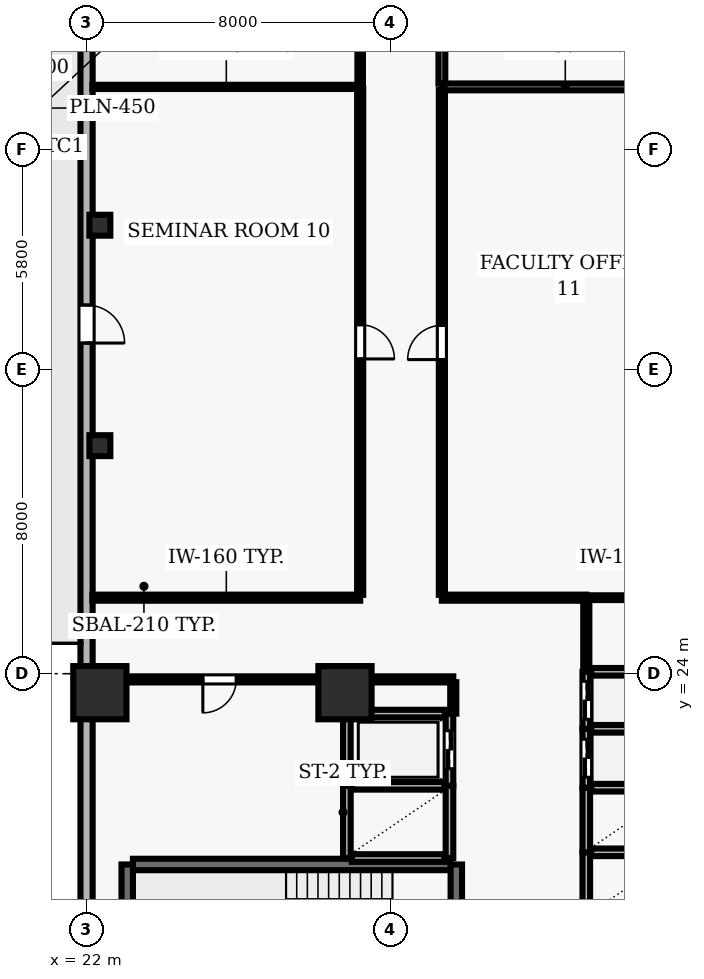
"""IFC4 building model, lengths in metres.
Left out: names, types, materials, properties, quantities, classifications, styles, units other than length and angle.
Written with IfcOpenShell. Run it as: python <this file> out.ifc"""

import sys

from ifc_helpers import new_model, si_unit, direction, frame, frame_2d, origin, origin_2d, place, context, subcontext, project, spatial, rectangle, hollow_rectangle, extrude, element, fill, save


model = new_model("IFC4")
c1 = context("Model", 3, precision=1e-05, world=origin(), true_north=direction((0.0, 1.0)))
c2 = subcontext(c1, "Body", "Model", "MODEL_VIEW")
j1 = project(units=[si_unit("LENGTHUNIT", "METRE"), si_unit("PLANEANGLEUNIT", "RADIAN")], contexts=[c1])
p1 = place(None, origin())
s1 = spatial("IfcSite", under=j1, at=p1, CompositionType="ELEMENT")
p2 = place(p1, origin())
s2 = spatial("IfcBuilding", under=s1, at=p2, CompositionType="ELEMENT")
p3 = place(p2, frame((0.0, 0.0, 50.5)))
s3 = spatial("IfcBuildingStorey", under=s2, at=p3, CompositionType="ELEMENT", Elevation=50.5)
for number, where, z_axis, x_axis in (
    (1, (22.35, 23.5, 0.0), (0.0, 0.0, 1.0), (1.0, 0.0, 0.0)),
    (2, (28.8, 23.5, 0.0), (0.0, 0.0, 1.0), (1.0, 0.0, 0.0)),
):
    element("IfcColumn", number, at=place(p3, frame(where, z_axis=z_axis, x_axis=x_axis)), inside=s3, PredefinedType="COLUMN", context=c2, shape_type="SweptSolid", body=[
        extrude(rectangle(XDim=1.4, YDim=1.4, at=origin_2d()), origin(), (0.0, 0.0, 1.0), 3.9),
    ])
for number, where, z_axis, x_axis in (
    (3, (22.35, 30.0, 0.0), (0.0, 0.0, 1.0), (1.0, 0.0, 0.0)),
    (4, (22.35, 35.8, 0.0), (0.0, 0.0, 1.0), (1.0, 0.0, 0.0)),
):
    element("IfcColumn", number, at=place(p3, frame(where, z_axis=z_axis, x_axis=x_axis)), inside=s3, PredefinedType="COLUMN", context=c2, shape_type="SweptSolid", body=[
        extrude(hollow_rectangle(XDim=0.55, YDim=0.55, WallThickness=0.025, at=origin_2d()), origin(), (0.0, 0.0, 1.0), 3.9),
    ])
p4 = place(p3, frame((22.0, 51.5, 0.0), z_axis=(0.0, 0.0, 1.0), x_axis=(0.0, -1.0, 0.0)))
e5 = element("IfcWall", 5, at=p4, inside=s3, PredefinedType="SOLIDWALL", context=c2, shape_type="SweptSolid", body=[
    extrude(rectangle(XDim=49.0, YDim=0.32, at=frame_2d((24.5, 0.0))), origin(), (0.0, 0.0, 1.0), 3.69),
])
p5 = place(p4, frame((17.8, 0.0, 0.0)))
e6 = element("IfcOpeningElement", 6, at=p5, cuts=e5, PredefinedType="OPENING", context=c2, shape_type="SweptSolid", body=[
    extrude(rectangle(XDim=1.0, YDim=2.2, at=frame_2d((0.5, 1.1))), frame((0.0, 0.17, 0.0), z_axis=(0.0, -1.0, 0.0), x_axis=(1.0, 0.0, 0.0)), (0.0, 0.0, 1.0), 0.34),
])
p6 = place(p4, frame((1.222, 0.0, 0.9)))
e7 = element("IfcOpeningElement", 7, at=p6, cuts=e5, PredefinedType="OPENING", context=c2, shape_type="SweptSolid", body=[
    extrude(rectangle(XDim=3.0, YDim=2.2, at=frame_2d((1.5, 1.1))), frame((0.0, 0.17, 0.0), z_axis=(0.0, -1.0, 0.0), x_axis=(1.0, 0.0, 0.0)), (0.0, 0.0, 1.0), 0.34),
])
p7 = place(p4, frame((6.667, 0.0, 0.9)))
e8 = element("IfcOpeningElement", 8, at=p7, cuts=e5, PredefinedType="OPENING", context=c2, shape_type="SweptSolid", body=[
    extrude(rectangle(XDim=3.0, YDim=2.2, at=frame_2d((1.5, 1.1))), frame((0.0, 0.17, 0.0), z_axis=(0.0, -1.0, 0.0), x_axis=(1.0, 0.0, 0.0)), (0.0, 0.0, 1.0), 0.34),
])
p8 = place(p4, frame((39.333, 0.0, 0.9)))
e9 = element("IfcOpeningElement", 9, at=p8, cuts=e5, PredefinedType="OPENING", context=c2, shape_type="SweptSolid", body=[
    extrude(rectangle(XDim=3.0, YDim=2.2, at=frame_2d((1.5, 1.1))), frame((0.0, 0.17, 0.0), z_axis=(0.0, -1.0, 0.0), x_axis=(1.0, 0.0, 0.0)), (0.0, 0.0, 1.0), 0.34),
])
p9 = place(p3, frame((31.58, 18.98, 0.0), z_axis=(0.0, 0.0, 1.0), x_axis=(-1.0, 0.0, 0.0)))
e10 = element("IfcWall", 10, at=p9, inside=s3, PredefinedType="SHEAR", context=c2, shape_type="SweptSolid", body=[
    extrude(rectangle(XDim=8.36, YDim=0.3, at=frame_2d((4.18, 0.0))), origin(), (0.0, 0.0, 1.0), 3.69),
])
p10 = place(p3, frame((23.07, 18.98, 0.0), z_axis=(0.0, 0.0, 1.0), x_axis=(0.0, -1.0, 0.0)))
e11 = element("IfcWall", 11, at=p10, inside=s3, PredefinedType="SHEAR", context=c2, shape_type="SweptSolid", body=[
    extrude(rectangle(XDim=3.51, YDim=0.3, at=frame_2d((1.755, 0.0))), origin(), (0.0, 0.0, 1.0), 3.69),
])
p11 = place(p3, frame((31.73, 15.47, 0.0), z_axis=(0.0, 0.0, 1.0), x_axis=(0.0, 1.0, 0.0)))
e12 = element("IfcWall", 12, at=p11, inside=s3, PredefinedType="SHEAR", context=c2, shape_type="SweptSolid", body=[
    extrude(rectangle(XDim=3.51, YDim=0.3, at=frame_2d((1.755, 0.0))), origin(), (0.0, 0.0, 1.0), 3.69),
])
p12 = place(p11, frame((1.18, 0.0, 0.0)))
e13 = element("IfcOpeningElement", 13, at=p12, cuts=e12, PredefinedType="OPENING", context=c2, shape_type="SweptSolid", body=[
    extrude(rectangle(XDim=1.15, YDim=2.15, at=frame_2d((0.575, 1.075))), frame((0.0, 0.16, 0.0), z_axis=(0.0, -1.0, 0.0), x_axis=(1.0, 0.0, 0.0)), (0.0, 0.0, 1.0), 0.32),
])
p13 = place(p3, frame((35.15, 19.3, 0.0), z_axis=(0.0, 0.0, 1.0), x_axis=(0.0, -1.0, 0.0)))
e14 = element("IfcWall", 14, at=p13, inside=s3, PredefinedType="SOLIDWALL", context=c2, shape_type="SweptSolid", body=[
    extrude(rectangle(XDim=1.7, YDim=0.2, at=frame_2d((0.85, 0.0))), origin(), (0.0, 0.0, 1.0), 3.69),
])
p14 = place(p3, frame((37.42, 19.3, 0.0), z_axis=(0.0, 0.0, 1.0), x_axis=(-1.0, 0.0, 0.0)))
e15 = element("IfcWall", 15, at=p14, inside=s3, PredefinedType="SOLIDWALL", context=c2, shape_type="SweptSolid", body=[
    extrude(rectangle(XDim=2.14, YDim=0.2, at=frame_2d((1.07, 0.0))), origin(), (0.0, 0.0, 1.0), 3.69),
])
p15 = place(p3, frame((35.15, 21.0, 0.0), z_axis=(0.0, 0.0, 1.0), x_axis=(0.0, -1.0, 0.0)))
e16 = element("IfcWall", 16, at=p15, inside=s3, PredefinedType="SOLIDWALL", context=c2, shape_type="SweptSolid", body=[
    extrude(rectangle(XDim=1.7, YDim=0.2, at=frame_2d((0.85, 0.0))), origin(), (0.0, 0.0, 1.0), 3.69),
])
p16 = place(p3, frame((37.42, 21.0, 0.0), z_axis=(0.0, 0.0, 1.0), x_axis=(-1.0, 0.0, 0.0)))
e17 = element("IfcWall", 17, at=p16, inside=s3, PredefinedType="SOLIDWALL", context=c2, shape_type="SweptSolid", body=[
    extrude(rectangle(XDim=2.14, YDim=0.2, at=frame_2d((1.07, 0.0))), origin(), (0.0, 0.0, 1.0), 3.69),
])
for number, where, z_axis, x_axis in (
    (18, (28.85, 21.05, 0.0), (0.0, 0.0, 1.0), (0.0, -1.0, 0.0)),
    (19, (31.55, 19.15, 0.0), (0.0, 0.0, 1.0), (0.0, 1.0, 0.0)),
):
    element("IfcWall", number, at=place(p3, frame(where, z_axis=z_axis, x_axis=x_axis)), inside=s3, PredefinedType="SOLIDWALL", context=c2, shape_type="SweptSolid", body=[
        extrude(rectangle(XDim=1.9, YDim=0.2, at=frame_2d((0.95, 0.0))), origin(), (0.0, 0.0, 1.0), 3.69),
    ])
for number, where, z_axis, x_axis in (
    (20, (28.98, 19.15, 0.0), (0.0, 0.0, 1.0), (1.0, 0.0, 0.0)),
    (21, (31.42, 21.05, 0.0), (0.0, 0.0, 1.0), (-1.0, 0.0, 0.0)),
):
    element("IfcWall", number, at=place(p3, frame(where, z_axis=z_axis, x_axis=x_axis)), inside=s3, PredefinedType="SOLIDWALL", context=c2, shape_type="SweptSolid", body=[
        extrude(rectangle(XDim=2.44, YDim=0.2, at=frame_2d((1.22, 0.0))), origin(), (0.0, 0.0, 1.0), 3.69),
    ])
p17 = place(p3, frame((35.15, 22.55, 0.0), z_axis=(0.0, 0.0, 1.0), x_axis=(0.0, -1.0, 0.0)))
e22 = element("IfcWall", 22, at=p17, inside=s3, PredefinedType="SOLIDWALL", context=c2, shape_type="SweptSolid", body=[
    extrude(rectangle(XDim=1.55, YDim=0.2, at=frame_2d((0.775, 0.0))), origin(), (0.0, 0.0, 1.0), 3.69),
])
p18 = place(p17, frame((0.275, 0.0, 0.0)))
e23 = element("IfcOpeningElement", 23, at=p18, cuts=e22, PredefinedType="OPENING", context=c2, shape_type="SweptSolid", body=[
    extrude(rectangle(XDim=1.0, YDim=2.1, at=frame_2d((0.5, 1.05))), frame((0.0, 0.11, 0.0), z_axis=(0.0, -1.0, 0.0), x_axis=(1.0, 0.0, 0.0)), (0.0, 0.0, 1.0), 0.22),
])
p19 = place(p3, frame((37.42, 22.55, 0.0), z_axis=(0.0, 0.0, 1.0), x_axis=(-1.0, 0.0, 0.0)))
e24 = element("IfcWall", 24, at=p19, inside=s3, PredefinedType="SOLIDWALL", context=c2, shape_type="SweptSolid", body=[
    extrude(rectangle(XDim=2.14, YDim=0.2, at=frame_2d((1.07, 0.0))), origin(), (0.0, 0.0, 1.0), 3.69),
])
p20 = place(p3, frame((35.15, 24.05, 0.0), z_axis=(0.0, 0.0, 1.0), x_axis=(0.0, -1.0, 0.0)))
e25 = element("IfcWall", 25, at=p20, inside=s3, PredefinedType="SOLIDWALL", context=c2, shape_type="SweptSolid", body=[
    extrude(rectangle(XDim=1.5, YDim=0.2, at=frame_2d((0.75, 0.0))), origin(), (0.0, 0.0, 1.0), 3.69),
])
p21 = place(p20, frame((0.25, 0.0, 0.0)))
e26 = element("IfcOpeningElement", 26, at=p21, cuts=e25, PredefinedType="OPENING", context=c2, shape_type="SweptSolid", body=[
    extrude(rectangle(XDim=1.0, YDim=2.1, at=frame_2d((0.5, 1.05))), frame((0.0, 0.11, 0.0), z_axis=(0.0, -1.0, 0.0), x_axis=(1.0, 0.0, 0.0)), (0.0, 0.0, 1.0), 0.22),
])
p22 = place(p3, frame((37.42, 24.05, 0.0), z_axis=(0.0, 0.0, 1.0), x_axis=(-1.0, 0.0, 0.0)))
e27 = element("IfcWall", 27, at=p22, inside=s3, PredefinedType="SOLIDWALL", context=c2, shape_type="SweptSolid", body=[
    extrude(rectangle(XDim=2.14, YDim=0.2, at=frame_2d((1.07, 0.0))), origin(), (0.0, 0.0, 1.0), 3.69),
])
p23 = place(p3, frame((28.85, 22.95, 0.0), z_axis=(0.0, 0.0, 1.0), x_axis=(0.0, -1.0, 0.0)))
e28 = element("IfcWall", 28, at=p23, inside=s3, PredefinedType="SOLIDWALL", context=c2, shape_type="SweptSolid", body=[
    extrude(rectangle(XDim=1.9, YDim=0.2, at=frame_2d((0.95, 0.0))), origin(), (0.0, 0.0, 1.0), 3.69),
])
p24 = place(p3, frame((31.55, 21.05, 0.0), z_axis=(0.0, 0.0, 1.0), x_axis=(0.0, 1.0, 0.0)))
e29 = element("IfcWall", 29, at=p24, inside=s3, PredefinedType="SOLIDWALL", context=c2, shape_type="SweptSolid", body=[
    extrude(rectangle(XDim=1.9, YDim=0.2, at=frame_2d((0.95, 0.0))), origin(), (0.0, 0.0, 1.0), 3.69),
])
p25 = place(p24, frame((0.45, 0.0, 0.0)))
e30 = element("IfcOpeningElement", 30, at=p25, cuts=e29, PredefinedType="OPENING", context=c2, shape_type="SweptSolid", body=[
    extrude(rectangle(XDim=1.0, YDim=2.1, at=frame_2d((0.5, 1.05))), frame((0.0, 0.11, 0.0), z_axis=(0.0, -1.0, 0.0), x_axis=(1.0, 0.0, 0.0)), (0.0, 0.0, 1.0), 0.22),
])
p26 = place(p3, frame((31.43, 22.95, 0.0), z_axis=(0.0, 0.0, 1.0), x_axis=(-1.0, 0.0, 0.0)))
e31 = element("IfcWall", 31, at=p26, inside=s3, PredefinedType="SOLIDWALL", context=c2, shape_type="SweptSolid", body=[
    extrude(rectangle(XDim=2.46, YDim=0.2, at=frame_2d((1.23, 0.0))), origin(), (0.0, 0.0, 1.0), 3.69),
])
p27 = place(p3, frame((28.8, 23.85, 0.0), z_axis=(0.0, 0.0, 1.0), x_axis=(-1.0, 0.0, 0.0)))
e32 = element("IfcWall", 32, at=p27, inside=s3, PredefinedType="PARTITIONING", context=c2, shape_type="SweptSolid", body=[
    extrude(rectangle(XDim=6.6, YDim=0.16, at=frame_2d((3.3, 0.0))), origin(), (0.0, 0.0, 1.0), 3.055),
])
p28 = place(p27, frame((2.86, 0.0, 0.0)))
e33 = element("IfcOpeningElement", 33, at=p28, cuts=e32, PredefinedType="OPENING", context=c2, shape_type="SweptSolid", body=[
    extrude(rectangle(XDim=0.88, YDim=2.1, at=frame_2d((0.44, 1.05))), frame((0.0, 0.09, 0.0), z_axis=(0.0, -1.0, 0.0), x_axis=(1.0, 0.0, 0.0)), (0.0, 0.0, 1.0), 0.18),
])
p29 = place(p3, frame((28.8, 23.85, 0.0), z_axis=(0.0, 0.0, 1.0), x_axis=(1.0, 0.0, 0.0)))
e34 = element("IfcWall", 34, at=p29, inside=s3, PredefinedType="PARTITIONING", context=c2, shape_type="SweptSolid", body=[
    extrude(rectangle(XDim=2.85, YDim=0.16, at=frame_2d((1.425, 0.0))), origin(), (0.0, 0.0, 1.0), 3.69),
])
p30 = place(p3, frame((29.2, 26.0, 0.0), z_axis=(0.0, 0.0, 1.0), x_axis=(-1.0, 0.0, 0.0)))
e35 = element("IfcWall", 35, at=p30, inside=s3, PredefinedType="PARTITIONING", context=c2, shape_type="SweptSolid", body=[
    extrude(rectangle(XDim=7.045, YDim=0.16, at=frame_2d((3.522, 0.0))), origin(), (0.0, 0.0, 1.0), 3.69),
])
p31 = place(p3, frame((29.2, 39.44, 0.0), z_axis=(0.0, 0.0, 1.0), x_axis=(-1.0, 0.0, 0.0)))
e36 = element("IfcWall", 36, at=p31, inside=s3, PredefinedType="MOVABLE", context=c2, shape_type="SweptSolid", body=[
    extrude(rectangle(XDim=7.045, YDim=0.11, at=frame_2d((3.522, 0.0))), origin(), (0.0, 0.0, 1.0), 3.69),
])
p32 = place(p3, frame((35.15, 26.0, 0.0), z_axis=(0.0, 0.0, 1.0), x_axis=(-1.0, 0.0, 0.0)))
e37 = element("IfcWall", 37, at=p32, inside=s3, PredefinedType="PARTITIONING", context=c2, shape_type="SweptSolid", body=[
    extrude(rectangle(XDim=3.8, YDim=0.16, at=frame_2d((1.9, 0.0))), origin(), (0.0, 0.0, 1.0), 3.69),
])
p33 = place(p3, frame((35.15, 26.0, 0.0), z_axis=(0.0, 0.0, 1.0), x_axis=(1.0, 0.0, 0.0)))
e38 = element("IfcWall", 38, at=p33, inside=s3, PredefinedType="PARTITIONING", context=c2, shape_type="SweptSolid", body=[
    extrude(rectangle(XDim=2.7, YDim=0.125, at=frame_2d((1.35, 0.0))), origin(), (0.0, 0.0, 1.0), 3.69),
])
p34 = place(p3, frame((37.845, 39.44, 0.0), z_axis=(0.0, 0.0, 1.0), x_axis=(-1.0, 0.0, 0.0)))
e39 = element("IfcWall", 39, at=p34, inside=s3, PredefinedType="PARTITIONING", context=c2, shape_type="SweptSolid", body=[
    extrude(rectangle(XDim=6.495, YDim=0.18, at=frame_2d((3.248, 0.0))), origin(), (0.0, 0.0, 1.0), 3.69),
])
p35 = place(p3, frame((28.8, 22.95, 0.0), z_axis=(0.0, 0.0, 1.0), x_axis=(0.0, 1.0, 0.0)))
e40 = element("IfcWall", 40, at=p35, inside=s3, PredefinedType="PARTITIONING", context=c2, shape_type="SweptSolid", body=[
    extrude(rectangle(XDim=0.825, YDim=0.135, at=frame_2d((0.413, 0.0))), origin(), (0.0, 0.0, 1.0), 3.69),
])
p36 = place(p3, frame((29.2, 39.39, 0.0), z_axis=(0.0, 0.0, 1.0), x_axis=(0.0, -1.0, 0.0)))
e41 = element("IfcWall", 41, at=p36, inside=s3, PredefinedType="PARTITIONING", context=c2, shape_type="SweptSolid", body=[
    extrude(rectangle(XDim=13.315, YDim=0.16, at=frame_2d((6.657, 0.0))), origin(), (0.0, 0.0, 1.0), 3.69),
])
p37 = place(p36, frame((6.208, 0.0, 0.0)))
e42 = element("IfcOpeningElement", 42, at=p37, cuts=e41, PredefinedType="OPENING", context=c2, shape_type="SweptSolid", body=[
    extrude(rectangle(XDim=0.9, YDim=2.1, at=frame_2d((0.45, 1.05))), frame((0.0, 0.09, 0.0), z_axis=(0.0, -1.0, 0.0), x_axis=(1.0, 0.0, 0.0)), (0.0, 0.0, 1.0), 0.18),
])
p38 = place(p3, frame((29.2, 53.845, 0.0), z_axis=(0.0, 0.0, 1.0), x_axis=(0.0, -1.0, 0.0)))
e43 = element("IfcWall", 43, at=p38, inside=s3, PredefinedType="PARTITIONING", context=c2, shape_type="SweptSolid", body=[
    extrude(rectangle(XDim=14.355, YDim=0.145, at=frame_2d((7.177, 0.0))), origin(), (0.0, 0.0, 1.0), 3.69),
])
p39 = place(p38, frame((6.627, 0.0, 0.0)))
e44 = element("IfcOpeningElement", 44, at=p39, cuts=e43, PredefinedType="OPENING", context=c2, shape_type="SweptSolid", body=[
    extrude(rectangle(XDim=1.1, YDim=2.15, at=frame_2d((0.55, 1.075))), frame((0.0, 0.083, 0.0), z_axis=(0.0, -1.0, 0.0), x_axis=(1.0, 0.0, 0.0)), (0.0, 0.0, 1.0), 0.165),
])
p40 = place(p3, frame((31.35, 26.075, 0.0), z_axis=(0.0, 0.0, 1.0), x_axis=(0.0, 1.0, 0.0)))
e45 = element("IfcWall", 45, at=p40, inside=s3, PredefinedType="PARTITIONING", context=c2, shape_type="SweptSolid", body=[
    extrude(rectangle(XDim=13.28, YDim=0.16, at=frame_2d((6.64, 0.0))), origin(), (0.0, 0.0, 1.0), 3.69),
])
p41 = place(p40, frame((6.19, 0.0, 0.0)))
e46 = element("IfcOpeningElement", 46, at=p41, cuts=e45, PredefinedType="OPENING", context=c2, shape_type="SweptSolid", body=[
    extrude(rectangle(XDim=0.9, YDim=2.1, at=frame_2d((0.45, 1.05))), frame((0.0, 0.09, 0.0), z_axis=(0.0, -1.0, 0.0), x_axis=(1.0, 0.0, 0.0)), (0.0, 0.0, 1.0), 0.18),
])
p42 = place(p3, frame((31.35, 39.525, 0.0), z_axis=(0.0, 0.0, 1.0), x_axis=(0.0, 1.0, 0.0)))
e47 = element("IfcWall", 47, at=p42, inside=s3, PredefinedType="PARTITIONING", context=c2, shape_type="SweptSolid", body=[
    extrude(rectangle(XDim=14.32, YDim=0.18, at=frame_2d((7.16, 0.0))), origin(), (0.0, 0.0, 1.0), 3.69),
])
p43 = place(p42, frame((6.685, 0.0, 0.0)))
e48 = element("IfcOpeningElement", 48, at=p43, cuts=e47, PredefinedType="OPENING", context=c2, shape_type="SweptSolid", body=[
    extrude(rectangle(XDim=0.95, YDim=2.1, at=frame_2d((0.475, 1.05))), frame((0.0, 0.1, 0.0), z_axis=(0.0, -1.0, 0.0), x_axis=(1.0, 0.0, 0.0)), (0.0, 0.0, 1.0), 0.2),
])
p44 = place(p3, frame((31.65, 23.775, 0.0), z_axis=(0.0, 0.0, 1.0), x_axis=(0.0, -1.0, 0.0)))
e49 = element("IfcWall", 49, at=p44, inside=s3, PredefinedType="PARTITIONING", context=c2, shape_type="SweptSolid", body=[
    extrude(rectangle(XDim=0.825, YDim=0.16, at=frame_2d((0.413, 0.0))), origin(), (0.0, 0.0, 1.0), 3.69),
])
p45 = place(p3, frame((35.15, 24.07, 0.0), z_axis=(0.0, 0.0, 1.0), x_axis=(0.0, 1.0, 0.0)))
e50 = element("IfcWall", 50, at=p45, inside=s3, PredefinedType="PARTITIONING", context=c2, shape_type="SweptSolid", body=[
    extrude(rectangle(XDim=1.855, YDim=0.16, at=frame_2d((0.927, 0.0))), origin(), (0.0, 0.0, 1.0), 3.69),
])
p46 = place(p5, origin())
e51 = element("IfcDoor", 51, at=p46, inside=s3, OperationType="SINGLE_SWING_RIGHT", PredefinedType="DOOR", context=c2, shape_type="SweptSolid", body=[
    extrude(rectangle(XDim=1.0, YDim=2.2, at=frame_2d((0.5, 1.1))), frame((0.0, 0.025, 0.0), z_axis=(0.0, -1.0, 0.0), x_axis=(1.0, 0.0, 0.0)), (0.0, 0.0, 1.0), 0.05),
])
fill(e6, e51)
p47 = place(p18, origin())
e52 = element("IfcDoor", 52, at=p47, inside=s3, OperationType="DOUBLE_DOOR_SLIDING", PredefinedType="DOOR", context=c2, shape_type="SweptSolid", body=[
    extrude(rectangle(XDim=1.0, YDim=2.1, at=frame_2d((0.5, 1.05))), frame((0.0, 0.025, 0.0), z_axis=(0.0, -1.0, 0.0), x_axis=(1.0, 0.0, 0.0)), (0.0, 0.0, 1.0), 0.05),
])
fill(e23, e52)
p48 = place(p21, origin())
e53 = element("IfcDoor", 53, at=p48, inside=s3, OperationType="DOUBLE_DOOR_SLIDING", PredefinedType="DOOR", context=c2, shape_type="SweptSolid", body=[
    extrude(rectangle(XDim=1.0, YDim=2.1, at=frame_2d((0.5, 1.05))), frame((0.0, 0.025, 0.0), z_axis=(0.0, -1.0, 0.0), x_axis=(1.0, 0.0, 0.0)), (0.0, 0.0, 1.0), 0.05),
])
fill(e26, e53)
p49 = place(p25, origin())
e54 = element("IfcDoor", 54, at=p49, inside=s3, OperationType="DOUBLE_DOOR_SLIDING", PredefinedType="DOOR", context=c2, shape_type="SweptSolid", body=[
    extrude(rectangle(XDim=1.0, YDim=2.1, at=frame_2d((0.5, 1.05))), frame((0.0, 0.025, 0.0), z_axis=(0.0, -1.0, 0.0), x_axis=(1.0, 0.0, 0.0)), (0.0, 0.0, 1.0), 0.05),
])
fill(e30, e54)
p50 = place(p28, origin())
e55 = element("IfcDoor", 55, at=p50, inside=s3, OperationType="SINGLE_SWING_RIGHT", PredefinedType="DOOR", context=c2, shape_type="SweptSolid", body=[
    extrude(rectangle(XDim=0.88, YDim=2.1, at=frame_2d((0.44, 1.05))), frame((0.0, 0.025, 0.0), z_axis=(0.0, -1.0, 0.0), x_axis=(1.0, 0.0, 0.0)), (0.0, 0.0, 1.0), 0.05),
])
fill(e33, e55)
p51 = place(p37, origin())
e56 = element("IfcDoor", 56, at=p51, inside=s3, OperationType="SINGLE_SWING_RIGHT", PredefinedType="DOOR", context=c2, shape_type="SweptSolid", body=[
    extrude(rectangle(XDim=0.9, YDim=2.1, at=frame_2d((0.45, 1.05))), frame((0.0, 0.025, 0.0), z_axis=(0.0, -1.0, 0.0), x_axis=(1.0, 0.0, 0.0)), (0.0, 0.0, 1.0), 0.05),
])
fill(e42, e56)
p52 = place(p41, origin())
e57 = element("IfcDoor", 57, at=p52, inside=s3, OperationType="SINGLE_SWING_LEFT", PredefinedType="DOOR", context=c2, shape_type="SweptSolid", body=[
    extrude(rectangle(XDim=0.9, YDim=2.1, at=frame_2d((0.45, 1.05))), frame((0.0, 0.025, 0.0), z_axis=(0.0, -1.0, 0.0), x_axis=(1.0, 0.0, 0.0)), (0.0, 0.0, 1.0), 0.05),
])
fill(e46, e57)
save(model, sys.argv[1])
